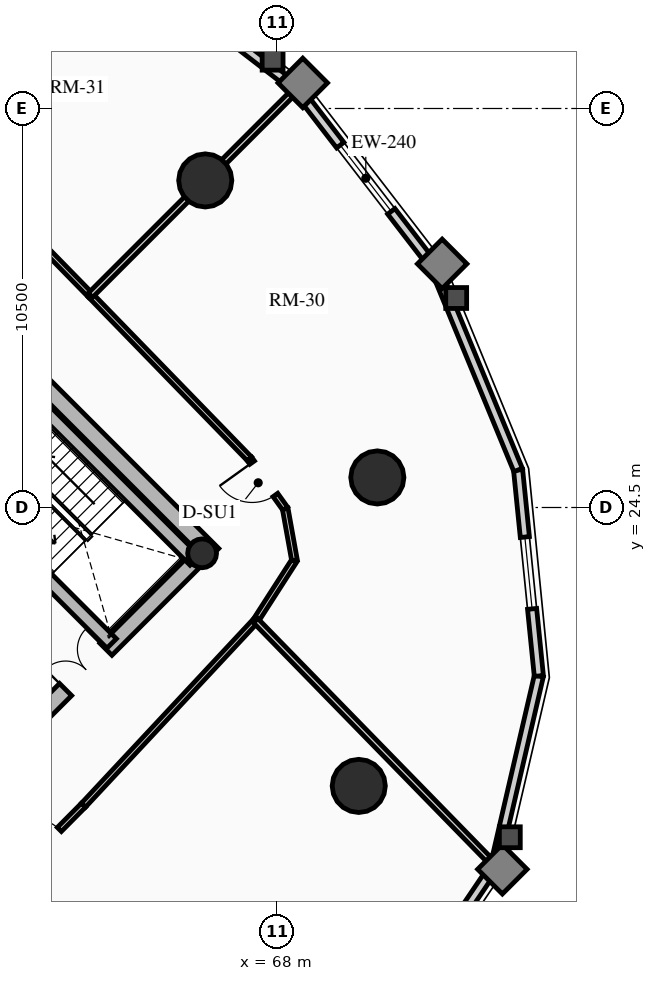
"""IFC4 building model, lengths in metres.
Left out: names, types, materials, properties, quantities, classifications, styles, units other than length and angle.
Written with IfcOpenShell. Run it as: python <this file> out.ifc"""

import sys

from ifc_helpers import new_model, si_unit, direction, frame, frame_2d, origin, origin_2d, place, context, subcontext, project, spatial, rectangle, circle, hollow_circle, extrude, source, transform, mapped, element, fill, save


model = new_model("IFC4")
c1 = context("Model", 3, precision=1e-05, world=origin(), true_north=direction((0.0, 1.0)))
c2 = subcontext(c1, "Body", "Model", "MODEL_VIEW")
j1 = project(units=[si_unit("LENGTHUNIT", "METRE"), si_unit("PLANEANGLEUNIT", "RADIAN")], contexts=[c1])
p1 = place(None, origin())
s1 = spatial("IfcSite", under=j1, at=p1, CompositionType="ELEMENT")
p2 = place(p1, origin())
s2 = spatial("IfcBuilding", under=s1, at=p2, CompositionType="ELEMENT")
p3 = place(p2, frame((0.0, 0.0, 129.16)))
s3 = spatial("IfcBuildingStorey", under=s2, at=p3, CompositionType="ELEMENT", Elevation=129.16)
p4 = place(p3, frame((66.303, 23.263, 0.0), z_axis=(0.0, 0.0, 1.0), x_axis=(-0.707106781187, 0.707106781187, 0.0)))
e1 = element("IfcWall", 1, at=p4, inside=s3, PredefinedType="SHEAR", context=c2, shape_type="SweptSolid", body=[
    extrude(rectangle(XDim=14.2, YDim=0.45, at=frame_2d((7.1, 0.0))), origin(), (0.0, 0.0, 1.0), 3.72),
])
p5 = place(p3, frame((58.578, 15.856, 0.0), z_axis=(0.0, 0.0, 1.0), x_axis=(0.707106781187, 0.707106781187, 0.0)))
e2 = element("IfcWall", 2, at=p5, inside=s3, PredefinedType="SHEAR", context=c2, shape_type="SweptSolid", body=[
    extrude(rectangle(XDim=10.7, YDim=0.45, at=frame_2d((5.35, 0.0))), origin(), (0.0, 0.0, 1.0), 3.72),
])
m1 = source(origin(), c2, "Body", "SweptSolid", [
    extrude(rectangle(XDim=1.5, YDim=2.02, at=frame_2d((0.75, 1.01))), frame((0.0, 0.235, 0.0), z_axis=(0.0, -1.0, 0.0), x_axis=(1.0, 0.0, 0.0)), (0.0, 0.0, 1.0), 0.47),
])
p6 = place(p5, frame((5.45, 0.0, 0.0)))
e3 = element("IfcOpeningElement", 3, at=p6, cuts=e2, PredefinedType="OPENING", context=c2, shape_type="MappedRepresentation", body=[
    mapped(m1, transform((0.0, 0.0, 0.0), x_axis=(1.0, 0.0, 0.0), y_axis=(0.0, 1.0, 0.0), z_axis=(0.0, 0.0, 1.0), scale=1.0)),
])
p7 = place(p3, frame((63.645, 20.922, 0.0), z_axis=(0.0, 0.0, 1.0), x_axis=(-0.707106781187, 0.707106781187, 0.0)))
e4 = element("IfcWall", 4, at=p7, inside=s3, PredefinedType="SHEAR", context=c2, shape_type="SweptSolid", body=[
    extrude(rectangle(XDim=13.75, YDim=0.35, at=frame_2d((6.875, 0.0))), origin(), (0.0, 0.0, 1.0), 3.72),
])
m2 = source(origin(), c2, "Body", "SweptSolid", [
    extrude(rectangle(XDim=1.1, YDim=2.015, at=frame_2d((0.55, 1.007))), frame((0.0, 0.185, 0.0), z_axis=(0.0, -1.0, 0.0), x_axis=(1.0, 0.0, 0.0)), (0.0, 0.0, 1.0), 0.37),
])
p8 = place(p7, frame((10.0, 0.0, 0.0)))
e5 = element("IfcOpeningElement", 5, at=p8, cuts=e4, PredefinedType="OPENING", context=c2, shape_type="MappedRepresentation", body=[
    mapped(m2, transform((0.0, 0.0, 0.0), x_axis=(1.0, 0.0, 0.0), y_axis=(0.0, 1.0, 0.0), z_axis=(0.0, 0.0, 1.0), scale=1.0)),
])
p9 = place(p7, frame((12.0, 0.0, 0.0)))
e6 = element("IfcOpeningElement", 6, at=p9, cuts=e4, PredefinedType="OPENING", context=c2, shape_type="MappedRepresentation", body=[
    mapped(m2, transform((0.0, 0.0, 0.0), x_axis=(1.0, 0.0, 0.0), y_axis=(0.0, 1.0, 0.0), z_axis=(0.0, 0.0, 1.0), scale=1.0)),
])
m3 = source(origin(), c2, "Body", "SweptSolid", [
    extrude(rectangle(XDim=1.15, YDim=2.02, at=frame_2d((0.575, 1.01))), frame((0.0, 0.185, 0.0), z_axis=(0.0, -1.0, 0.0), x_axis=(1.0, 0.0, 0.0)), (0.0, 0.0, 1.0), 0.37),
])
p10 = place(p7, frame((5.305, 0.0, 0.0)))
e7 = element("IfcOpeningElement", 7, at=p10, cuts=e4, PredefinedType="OPENING", context=c2, shape_type="MappedRepresentation", body=[
    mapped(m3, transform((0.0, 0.0, 0.0), x_axis=(1.0, 0.0, 0.0), y_axis=(0.0, 1.0, 0.0), z_axis=(0.0, 0.0, 1.0), scale=1.0)),
])
p11 = place(p3, frame((65.83, 23.107, 0.0), z_axis=(0.0, 0.0, 1.0), x_axis=(-0.707088616009, 0.707124945897, 0.0)))
e8 = element("IfcWall", 8, at=p11, inside=s3, PredefinedType="SHEAR", context=c2, shape_type="SweptSolid", body=[
    extrude(rectangle(XDim=6.72, YDim=0.35, at=frame_2d((3.36, 0.0))), origin(), (0.0, 0.0, 1.0), 3.72),
])
p12 = place(p3, frame((66.024, 23.294, 0.0), z_axis=(0.0, 0.0, 1.0), x_axis=(0.707106781187, 0.707106781187, 0.0)))
e9 = element("IfcColumn", 9, at=p12, inside=s3, PredefinedType="COLUMN", context=c2, shape_type="SweptSolid", body=[
    extrude(hollow_circle(Radius=0.38, WallThickness=0.032, at=origin_2d()), origin(), (0.0, 0.0, 1.0), 3.72),
])
for number, where, z_axis, x_axis in (
    (10, (66.107, 33.107, 0.0), (0.0, 0.0, 1.0), (1.0, 0.0, 0.0)),
    (11, (70.146, 17.173, 0.0), (0.0, 0.0, 1.0), (1.0, 0.0, 0.0)),
    (12, (70.635, 25.291, 0.0), (0.0, 0.0, 1.0), (1.0, 0.0, 0.0)),
):
    element("IfcColumn", number, at=place(p3, frame(where, z_axis=z_axis, x_axis=x_axis)), inside=s3, PredefinedType="USERDEFINED", context=c2, shape_type="SweptSolid", body=[
        extrude(circle(Radius=0.7, at=origin_2d()), origin(), (0.0, 0.0, 1.0), 3.72),
    ])
p13 = place(p3, frame((63.811, 39.145, 0.0), z_axis=(0.0, 0.0, 1.0), x_axis=(0.791982052206, -0.61054437102, 0.0)))
e13 = element("IfcWall", 13, at=p13, inside=s3, PredefinedType="SOLIDWALL", context=c2, shape_type="SweptSolid", body=[
    extrude(rectangle(XDim=5.942, YDim=0.24, at=frame_2d((2.971, 0.0))), origin(), (0.0, 0.0, 1.0), 2.949),
])
p14 = place(p3, frame((73.729, 15.08, 0.0), z_axis=(0.0, 0.0, 1.0), x_axis=(-0.559572880421, -0.828781148131, 0.0)))
e14 = element("IfcWall", 14, at=p14, inside=s3, PredefinedType="SOLIDWALL", context=c2, shape_type="SweptSolid", body=[
    extrude(rectangle(XDim=4.905, YDim=0.24, at=frame_2d((2.452, 0.0))), origin(), (0.0, 0.0, 1.0), 2.949),
])
m4 = source(origin(), c2, "Body", "SweptSolid", [
    extrude(rectangle(XDim=1.9, YDim=1.35, at=frame_2d((0.95, 0.675))), frame((0.0, 0.13, 0.0), z_axis=(0.0, -1.0, 0.0), x_axis=(1.0, 0.0, 0.0)), (0.0, 0.0, 1.0), 0.26),
])
p15 = place(p14, frame((1.502, 0.0, 0.65)))
e15 = element("IfcOpeningElement", 15, at=p15, cuts=e14, PredefinedType="OPENING", context=c2, shape_type="MappedRepresentation", body=[
    mapped(m4, transform((0.0, 0.0, 0.0), x_axis=(1.0, 0.0, 0.0), y_axis=(0.0, 1.0, 0.0), z_axis=(0.0, 0.0, 1.0), scale=1.0)),
])
p16 = place(p3, frame((74.885, 20.067, 0.0), z_axis=(0.0, 0.0, 1.0), x_axis=(-0.225834725257, -0.974165631126, 0.0)))
e16 = element("IfcWall", 16, at=p16, inside=s3, PredefinedType="SOLIDWALL", context=c2, shape_type="SweptSolid", body=[
    extrude(rectangle(XDim=5.119, YDim=0.24, at=frame_2d((2.56, 0.0))), origin(), (0.0, 0.0, 1.0), 2.949),
])
p17 = place(p3, frame((74.339, 25.487, 0.0), z_axis=(0.0, 0.0, 1.0), x_axis=(0.10015591906, -0.994971754311, 0.0)))
e17 = element("IfcWall", 17, at=p17, inside=s3, PredefinedType="SOLIDWALL", context=c2, shape_type="SweptSolid", body=[
    extrude(rectangle(XDim=5.448, YDim=0.24, at=frame_2d((2.724, 0.0))), origin(), (0.0, 0.0, 1.0), 2.949),
])
p18 = place(p17, frame((1.774, 0.0, 0.65)))
e18 = element("IfcOpeningElement", 18, at=p18, cuts=e17, PredefinedType="OPENING", context=c2, shape_type="MappedRepresentation", body=[
    mapped(m4, transform((0.0, 0.0, 0.0), x_axis=(1.0, 0.0, 0.0), y_axis=(0.0, 1.0, 0.0), z_axis=(0.0, 0.0, 1.0), scale=1.0)),
])
p19 = place(p3, frame((72.145, 30.811, 0.0), z_axis=(0.0, 0.0, 1.0), x_axis=(0.381027003055, -0.924563909604, 0.0)))
e19 = element("IfcWall", 19, at=p19, inside=s3, PredefinedType="SOLIDWALL", context=c2, shape_type="SweptSolid", body=[
    extrude(rectangle(XDim=5.758, YDim=0.24, at=frame_2d((2.879, 0.0))), origin(), (0.0, 0.0, 1.0), 2.949),
])
p20 = place(p3, frame((68.517, 35.517, 0.0), z_axis=(0.0, 0.0, 1.0), x_axis=(0.61054437102, -0.791982052206, 0.0)))
e20 = element("IfcWall", 20, at=p20, inside=s3, PredefinedType="SOLIDWALL", context=c2, shape_type="SweptSolid", body=[
    extrude(rectangle(XDim=5.942, YDim=0.24, at=frame_2d((2.971, 0.0))), origin(), (0.0, 0.0, 1.0), 2.949),
])
m5 = source(origin(), c2, "Body", "SweptSolid", [
    extrude(rectangle(XDim=2.2, YDim=1.35, at=frame_2d((1.1, 0.675))), frame((0.0, 0.13, 0.0), z_axis=(0.0, -1.0, 0.0), x_axis=(1.0, 0.0, 0.0)), (0.0, 0.0, 1.0), 0.26),
])
p21 = place(p20, frame((1.871, 0.0, 0.65)))
e21 = element("IfcOpeningElement", 21, at=p21, cuts=e20, PredefinedType="OPENING", context=c2, shape_type="MappedRepresentation", body=[
    mapped(m5, transform((0.0, 0.0, 0.0), x_axis=(1.0, 0.0, 0.0), y_axis=(0.0, 1.0, 0.0), z_axis=(0.0, 0.0, 1.0), scale=1.0)),
])
p22 = place(p3, frame((63.086, 30.086, 0.0), z_axis=(0.0, 0.0, 1.0), x_axis=(-0.699075897379, 0.715047473741, 0.0)))
e22 = element("IfcWall", 22, at=p22, inside=s3, PredefinedType="PARTITIONING", context=c2, shape_type="SweptSolid", body=[
    extrude(rectangle(XDim=6.114, YDim=0.15, at=frame_2d((3.057, 0.0))), origin(), (0.0, 0.0, 1.0), 2.995),
])
p23 = place(p3, frame((60.562, 14.31, 0.0), z_axis=(0.0, 0.0, 1.0), x_axis=(0.704566236161, 0.709638230975, 0.0)))
e23 = element("IfcWall", 23, at=p23, inside=s3, PredefinedType="PARTITIONING", context=c2, shape_type="SweptSolid", body=[
    extrude(rectangle(XDim=3.321, YDim=0.15, at=frame_2d((1.661, 0.0))), origin(), (0.0, 0.0, 1.0), 2.995),
])
m6 = source(origin(), c2, "Body", "SweptSolid", [
    extrude(rectangle(XDim=1.0, YDim=2.015, at=frame_2d((0.5, 1.007))), frame((0.0, 0.085, 0.0), z_axis=(0.0, -1.0, 0.0), x_axis=(1.0, 0.0, 0.0)), (0.0, 0.0, 1.0), 0.17),
])
p24 = place(p23, frame((1.421, 0.0, 0.0)))
e24 = element("IfcOpeningElement", 24, at=p24, cuts=e23, PredefinedType="OPENING", context=c2, shape_type="MappedRepresentation", body=[
    mapped(m6, transform((0.0, 0.0, 0.0), x_axis=(1.0, 0.0, 0.0), y_axis=(0.0, 1.0, 0.0), z_axis=(0.0, 0.0, 1.0), scale=1.0)),
])
p25 = place(p3, frame((62.903, 16.667, 0.0), z_axis=(0.0, 0.0, 1.0), x_axis=(0.682371947497, 0.731005147225, 0.0)))
e25 = element("IfcWall", 25, at=p25, inside=s3, PredefinedType="PARTITIONING", context=c2, shape_type="SweptSolid", body=[
    extrude(rectangle(XDim=6.642, YDim=0.15, at=frame_2d((3.321, 0.0))), origin(), (0.0, 0.0, 1.0), 2.995),
])
p26 = place(p3, frame((67.435, 21.521, 0.0), z_axis=(0.0, 0.0, 1.0), x_axis=(0.540777197838, 0.841165870859, 0.0)))
e26 = element("IfcWall", 26, at=p26, inside=s3, PredefinedType="PARTITIONING", context=c2, shape_type="SweptSolid", body=[
    extrude(rectangle(XDim=1.888, YDim=0.15, at=frame_2d((0.944, 0.0))), origin(), (0.0, 0.0, 1.0), 2.995),
])
p27 = place(p3, frame((68.456, 23.11, 0.0), z_axis=(0.0, 0.0, 1.0), x_axis=(-0.1772522795, 0.984165448191, 0.0)))
e27 = element("IfcWall", 27, at=p27, inside=s3, PredefinedType="PARTITIONING", context=c2, shape_type="SweptSolid", body=[
    extrude(rectangle(XDim=1.382, YDim=0.15, at=frame_2d((0.691, 0.0))), origin(), (0.0, 0.0, 1.0), 2.995),
])
p28 = place(p3, frame((68.211, 24.469, 0.0), z_axis=(0.0, 0.0, 1.0), x_axis=(-0.583012141368, 0.812463441034, 0.0)))
e28 = element("IfcWall", 28, at=p28, inside=s3, PredefinedType="PARTITIONING", context=c2, shape_type="SweptSolid", body=[
    extrude(rectangle(XDim=1.613, YDim=0.15, at=frame_2d((0.807, 0.0))), origin(), (0.0, 0.0, 1.0), 2.995),
])
m7 = source(origin(), c2, "Body", "SweptSolid", [
    extrude(rectangle(XDim=1.05, YDim=2.015, at=frame_2d((0.525, 1.007))), frame((0.0, 0.085, 0.0), z_axis=(0.0, -1.0, 0.0), x_axis=(1.0, 0.0, 0.0)), (0.0, 0.0, 1.0), 0.17),
])
p29 = place(p28, frame((0.443, 0.0, 0.0)))
e29 = element("IfcOpeningElement", 29, at=p29, cuts=e28, PredefinedType="OPENING", context=c2, shape_type="MappedRepresentation", body=[
    mapped(m7, transform((0.0, 0.0, 0.0), x_axis=(1.0, 0.0, 0.0), y_axis=(0.0, 1.0, 0.0), z_axis=(0.0, 0.0, 1.0), scale=1.0)),
])
p30 = place(p3, frame((67.27, 25.78, 0.0), z_axis=(0.0, 0.0, 1.0), x_axis=(-0.696847842907, 0.717218992942, 0.0)))
e30 = element("IfcWall", 30, at=p30, inside=s3, PredefinedType="PARTITIONING", context=c2, shape_type="SweptSolid", body=[
    extrude(rectangle(XDim=6.004, YDim=0.15, at=frame_2d((3.002, 0.0))), origin(), (0.0, 0.0, 1.0), 3.425),
])
p31 = place(p3, frame((63.086, 30.086, 0.0), z_axis=(0.0, 0.0, 1.0), x_axis=(0.707106781187, 0.707106781187, 0.0)))
e31 = element("IfcWall", 31, at=p31, inside=s3, PredefinedType="PARTITIONING", context=c2, shape_type="SweptSolid", body=[
    extrude(rectangle(XDim=7.661, YDim=0.16, at=frame_2d((3.831, 0.0))), origin(), (0.0, 0.0, 1.0), 2.949),
])
p32 = place(p3, frame((67.435, 21.521, 0.0), z_axis=(0.0, 0.0, 1.0), x_axis=(0.6983880073, -0.715719352302, 0.0)))
e32 = element("IfcWall", 32, at=p32, inside=s3, PredefinedType="PARTITIONING", context=c2, shape_type="SweptSolid", body=[
    extrude(rectangle(XDim=8.987, YDim=0.16, at=frame_2d((4.494, 0.0))), origin(), (0.0, 0.0, 1.0), 2.949),
])
m8 = source(origin(), c2, "Body", "SweptSolid", [
    extrude(rectangle(XDim=1.9, YDim=1.35, at=frame_2d((0.95, 0.675))), frame((0.0, 0.03, 0.0), z_axis=(0.0, -1.0, 0.0), x_axis=(1.0, 0.0, 0.0)), (0.0, 0.0, 1.0), 0.06),
])
p33 = place(p18, origin())
e33 = element("IfcWindow", 33, at=p33, inside=s3, PartitioningType="DOUBLE_PANEL_VERTICAL", PredefinedType="WINDOW", context=c2, shape_type="MappedRepresentation", body=[
    mapped(m8, transform((0.0, 0.0, 0.0), x_axis=(1.0, 0.0, 0.0), y_axis=(0.0, 1.0, 0.0), z_axis=(0.0, 0.0, 1.0), scale=1.0)),
])
fill(e18, e33)
m9 = source(origin(), c2, "Body", "SweptSolid", [
    extrude(rectangle(XDim=2.2, YDim=1.35, at=frame_2d((1.1, 0.675))), frame((0.0, 0.03, 0.0), z_axis=(0.0, -1.0, 0.0), x_axis=(1.0, 0.0, 0.0)), (0.0, 0.0, 1.0), 0.06),
])
p34 = place(p21, origin())
e34 = element("IfcWindow", 34, at=p34, inside=s3, PartitioningType="DOUBLE_PANEL_VERTICAL", PredefinedType="WINDOW", context=c2, shape_type="MappedRepresentation", body=[
    mapped(m9, transform((0.0, 0.0, 0.0), x_axis=(1.0, 0.0, 0.0), y_axis=(0.0, 1.0, 0.0), z_axis=(0.0, 0.0, 1.0), scale=1.0)),
])
fill(e21, e34)
m10 = source(origin(), c2, "Body", "SweptSolid", [
    extrude(rectangle(XDim=1.5, YDim=2.02, at=frame_2d((0.75, 1.01))), frame((0.0, 0.025, 0.0), z_axis=(0.0, -1.0, 0.0), x_axis=(1.0, 0.0, 0.0)), (0.0, 0.0, 1.0), 0.05),
])
p35 = place(p6, origin())
e35 = element("IfcDoor", 35, at=p35, inside=s3, OperationType="DOUBLE_DOOR_SINGLE_SWING", PredefinedType="DOOR", context=c2, shape_type="MappedRepresentation", body=[
    mapped(m10, transform((0.0, 0.0, 0.0), x_axis=(1.0, 0.0, 0.0), y_axis=(0.0, 1.0, 0.0), z_axis=(0.0, 0.0, 1.0), scale=1.0)),
])
fill(e3, e35)
m11 = source(origin(), c2, "Body", "SweptSolid", [
    extrude(rectangle(XDim=1.0, YDim=2.015, at=frame_2d((0.5, 1.007))), frame((0.0, 0.025, 0.0), z_axis=(0.0, -1.0, 0.0), x_axis=(1.0, 0.0, 0.0)), (0.0, 0.0, 1.0), 0.05),
])
p36 = place(p24, origin())
e36 = element("IfcDoor", 36, at=p36, inside=s3, OperationType="SINGLE_SWING_LEFT", PredefinedType="DOOR", context=c2, shape_type="MappedRepresentation", body=[
    mapped(m11, transform((0.0, 0.0, 0.0), x_axis=(1.0, 0.0, 0.0), y_axis=(0.0, 1.0, 0.0), z_axis=(0.0, 0.0, 1.0), scale=1.0)),
])
fill(e24, e36)
m12 = source(origin(), c2, "Body", "SweptSolid", [
    extrude(rectangle(XDim=1.05, YDim=2.015, at=frame_2d((0.525, 1.007))), frame((0.0, 0.025, 0.0), z_axis=(0.0, -1.0, 0.0), x_axis=(1.0, 0.0, 0.0)), (0.0, 0.0, 1.0), 0.05),
])
p37 = place(p29, origin())
e37 = element("IfcDoor", 37, at=p37, inside=s3, OperationType="SINGLE_SWING_RIGHT", PredefinedType="DOOR", context=c2, shape_type="MappedRepresentation", body=[
    mapped(m12, transform((0.0, 0.0, 0.0), x_axis=(1.0, 0.0, 0.0), y_axis=(0.0, 1.0, 0.0), z_axis=(0.0, 0.0, 1.0), scale=1.0)),
])
fill(e29, e37)
save(model, sys.argv[1])
